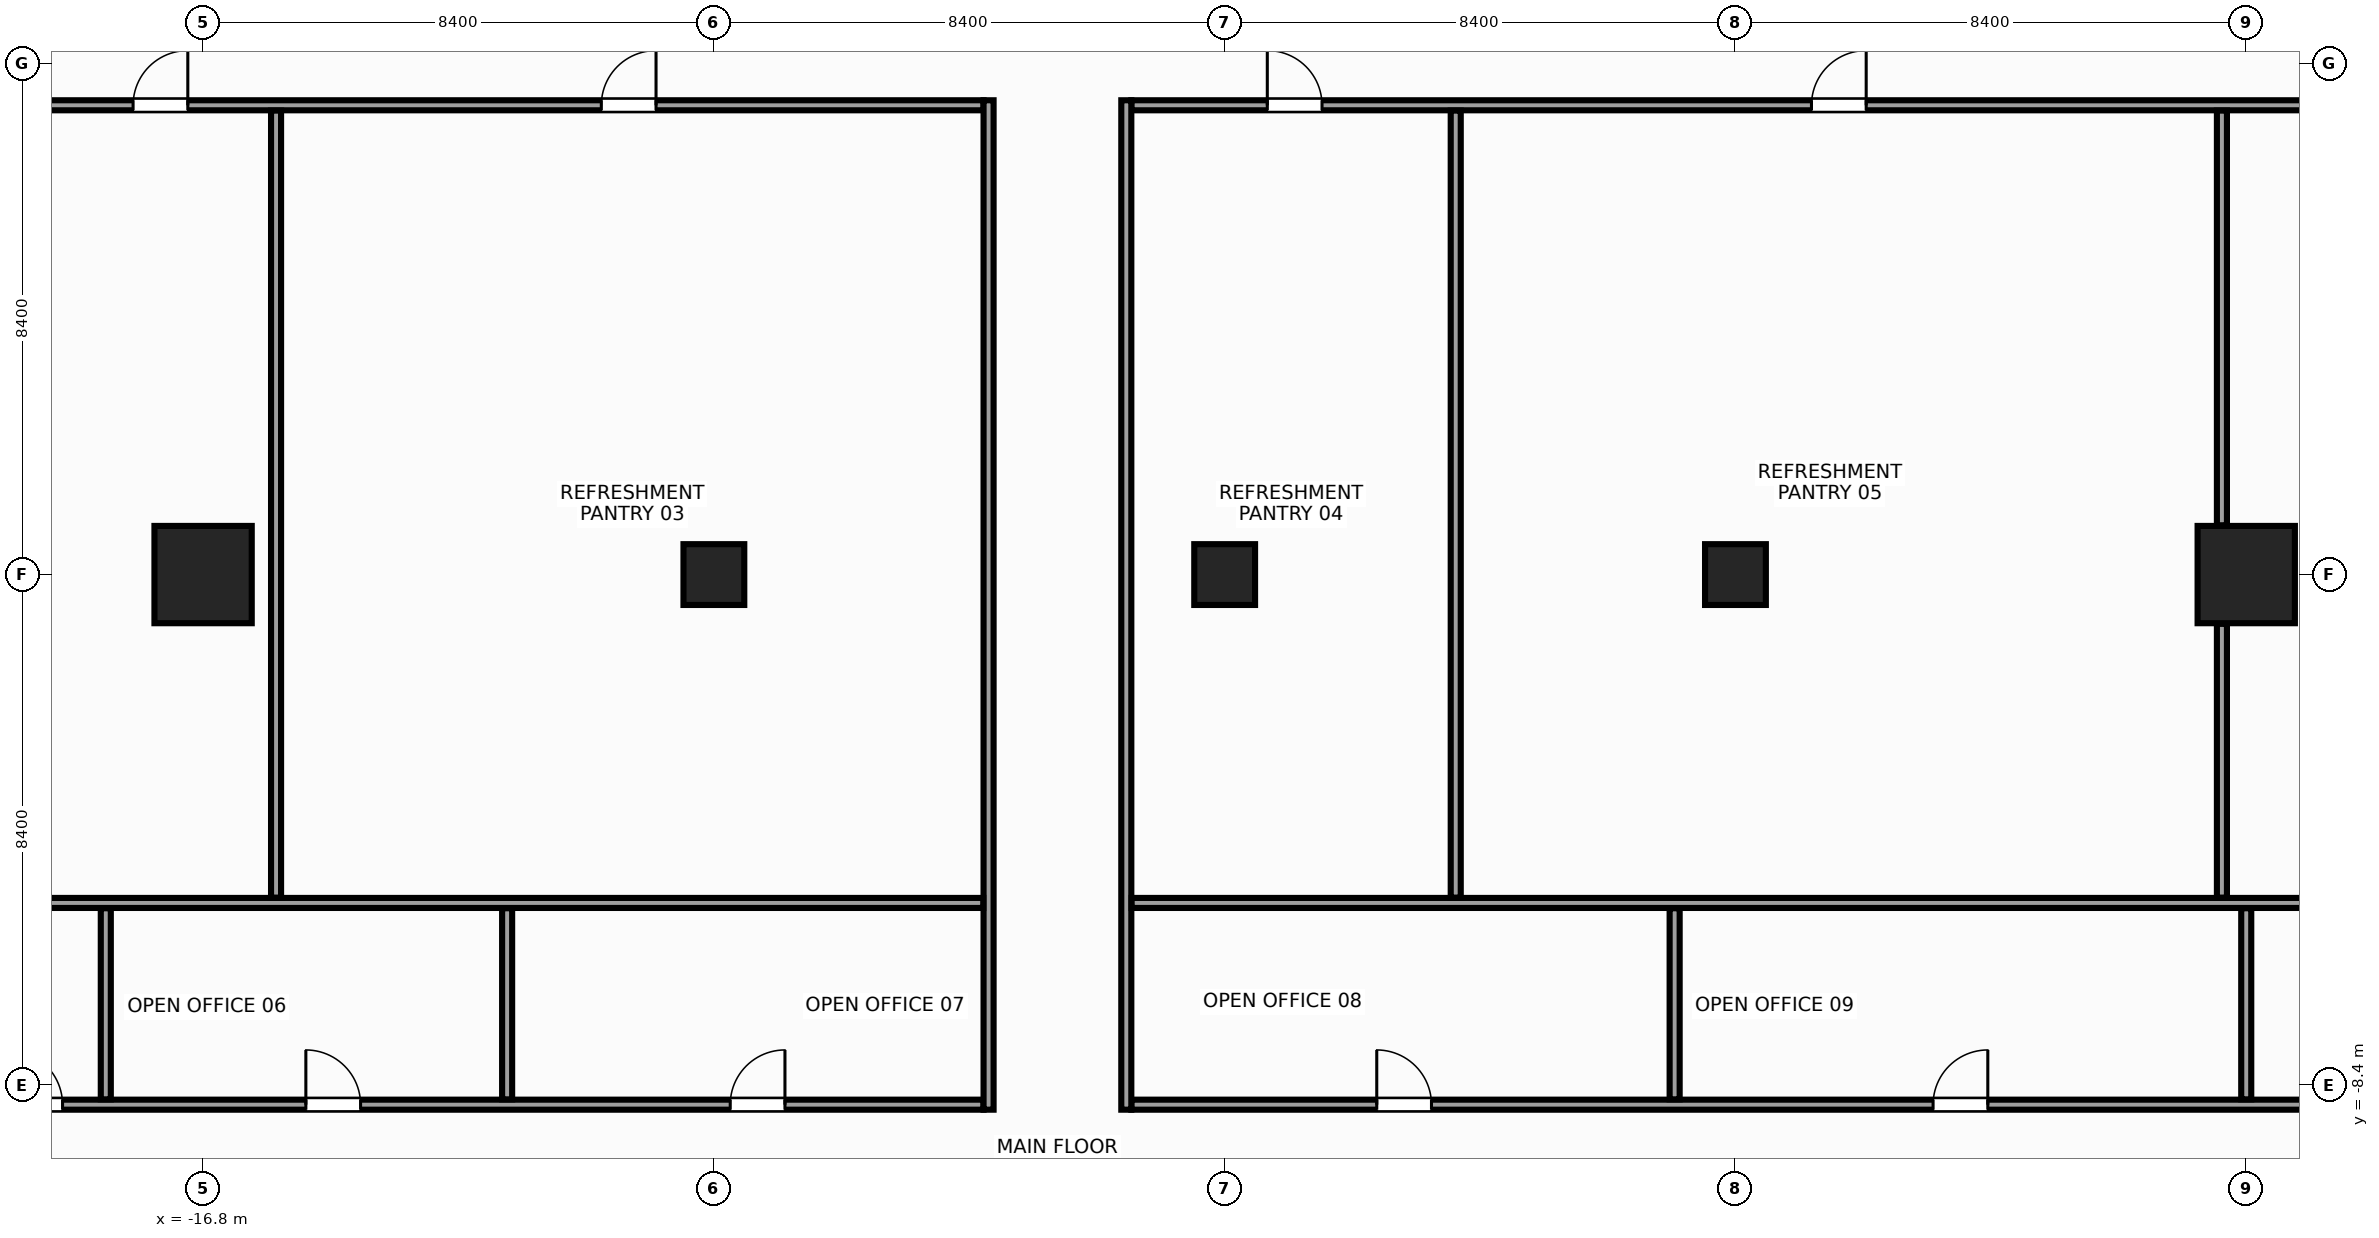
"""IFC4 building model, lengths in metres.
Left out: names, types, materials, properties, quantities, classifications, styles, units other than length and angle.
Written with IfcOpenShell. Run it as: python <this file> out.ifc"""

import sys

from ifc_helpers import new_model, si_unit, direction, frame, frame_2d, origin, origin_with_axes, origin_2d, place, context, subcontext, project, spatial, rectangle, hollow_rectangle, extrude, source, transform, mapped, element, fill, save


model = new_model("IFC4")
c1 = context("Model", 3, precision=1e-05, world=origin(), true_north=direction((0.0, 1.0)))
c2 = subcontext(c1, "Body", "Model", "MODEL_VIEW")
j1 = project(units=[si_unit("LENGTHUNIT", "METRE"), si_unit("PLANEANGLEUNIT", "RADIAN")], contexts=[c1])
p1 = place(None, origin())
s1 = spatial("IfcSite", under=j1, at=p1, CompositionType="ELEMENT")
p2 = place(p1, origin())
s2 = spatial("IfcBuilding", under=s1, at=p2, CompositionType="ELEMENT")
p3 = place(p2, frame((0.0, 0.0, 106.4)))
s3 = spatial("IfcBuildingStorey", under=s2, at=p3, CompositionType="ELEMENT", Elevation=106.4)
m1 = source(origin(), c2, "Body", "SweptSolid", [
    extrude(rectangle(XDim=1.6, YDim=1.6, at=origin_2d()), origin(), (0.0, 0.0, 1.0), 3.6),
])
for number, where, z_axis, x_axis in (
    (1, (-16.8, 0.0, 0.0), (0.0, 0.0, 1.0), (1.0, 0.0, 0.0)),
    (2, (16.8, 0.0, 0.0), (0.0, 0.0, 1.0), (1.0, 0.0, 0.0)),
):
    element("IfcColumn", number, at=place(p3, frame(where, z_axis=z_axis, x_axis=x_axis)), inside=s3, PredefinedType="COLUMN", context=c2, shape_type="MappedRepresentation", body=[
        mapped(m1, transform((0.0, 0.0, 0.0), x_axis=(1.0, 0.0, 0.0), y_axis=(0.0, 1.0, 0.0), z_axis=(0.0, 0.0, 1.0), scale=1.0)),
    ])
m2 = source(origin(), c2, "Body", "SweptSolid", [
    extrude(hollow_rectangle(XDim=1.0, YDim=1.0, WallThickness=0.045, at=origin_2d()), origin(), (0.0, 0.0, 1.0), 3.6),
])
for number, where, z_axis, x_axis in (
    (3, (-8.4, 0.0, 0.0), (0.0, 0.0, 1.0), (1.0, 0.0, 0.0)),
    (4, (8.4, 0.0, 0.0), (0.0, 0.0, 1.0), (1.0, 0.0, 0.0)),
):
    element("IfcColumn", number, at=place(p3, frame(where, z_axis=z_axis, x_axis=x_axis)), inside=s3, PredefinedType="COLUMN", context=c2, shape_type="MappedRepresentation", body=[
        mapped(m2, transform((0.0, 0.0, 0.0), x_axis=(1.0, 0.0, 0.0), y_axis=(0.0, 1.0, 0.0), z_axis=(0.0, 0.0, 1.0), scale=1.0)),
    ])
m3 = source(origin(), c2, "Body", "SweptSolid", [
    extrude(rectangle(XDim=1.0, YDim=1.0, at=origin_2d()), origin(), (0.0, 0.0, 1.0), 3.6),
])
p4 = place(p3, origin_with_axes())
e5 = element("IfcColumn", 5, at=p4, inside=s3, PredefinedType="COLUMN", context=c2, shape_type="MappedRepresentation", body=[
    mapped(m3, transform((0.0, 0.0, 0.0), x_axis=(1.0, 0.0, 0.0), y_axis=(0.0, 1.0, 0.0), z_axis=(0.0, 0.0, 1.0), scale=1.0)),
])
m4 = source(origin(), c2, "Body", "SweptSolid", [
    extrude(rectangle(XDim=16.8, YDim=0.165, at=frame_2d((8.4, 0.0))), origin(), (0.0, 0.0, 1.0), 2.745),
])
p5 = place(p3, frame((-20.765, 7.718, 0.0), z_axis=(0.0, 0.0, 1.0), x_axis=(1.0, 0.0, 0.0)))
e6 = element("IfcWall", 6, at=p5, inside=s3, PredefinedType="PARTITIONING", context=c2, shape_type="MappedRepresentation", body=[
    mapped(m4, transform((0.0, 0.0, 0.0), x_axis=(1.0, 0.0, 0.0), y_axis=(0.0, 1.0, 0.0), z_axis=(0.0, 0.0, 1.0), scale=1.0)),
])
p6 = place(p5, frame((2.814, 0.0, 0.0)))
e7 = element("IfcOpeningElement", 7, at=p6, cuts=e6, PredefinedType="OPENING", context=c2, shape_type="SweptSolid", body=[
    extrude(rectangle(XDim=0.9, YDim=2.15, at=frame_2d((0.45, 1.075))), frame((0.0, 0.094, 0.0), z_axis=(0.0, -1.0, 0.0), x_axis=(1.0, 0.0, 0.0)), (0.0, 0.0, 1.0), 0.189),
])
p7 = place(p5, frame((10.514, 0.0, 0.0)))
e8 = element("IfcOpeningElement", 8, at=p7, cuts=e6, PredefinedType="OPENING", context=c2, shape_type="SweptSolid", body=[
    extrude(rectangle(XDim=0.9, YDim=2.15, at=frame_2d((0.45, 1.075))), frame((0.0, 0.094, 0.0), z_axis=(0.0, -1.0, 0.0), x_axis=(1.0, 0.0, 0.0)), (0.0, 0.0, 1.0), 0.189),
])
m5 = source(origin(), c2, "Body", "SweptSolid", [
    extrude(rectangle(XDim=22.3, YDim=0.165, at=frame_2d((11.15, 0.0))), origin(), (0.0, 0.0, 1.0), 2.745),
])
p8 = place(p3, frame((-1.535, 7.718, 0.0), z_axis=(0.0, 0.0, 1.0), x_axis=(1.0, 0.0, 0.0)))
e9 = element("IfcWall", 9, at=p8, inside=s3, PredefinedType="PARTITIONING", context=c2, shape_type="MappedRepresentation", body=[
    mapped(m5, transform((0.0, 0.0, 0.0), x_axis=(1.0, 0.0, 0.0), y_axis=(0.0, 1.0, 0.0), z_axis=(0.0, 0.0, 1.0), scale=1.0)),
])
p9 = place(p8, frame((19.646, 0.0, 0.0)))
e10 = element("IfcOpeningElement", 10, at=p9, cuts=e9, PredefinedType="OPENING", context=c2, shape_type="SweptSolid", body=[
    extrude(rectangle(XDim=0.9, YDim=2.15, at=frame_2d((0.45, 1.075))), frame((0.0, 0.094, 0.0), z_axis=(0.0, -1.0, 0.0), x_axis=(1.0, 0.0, 0.0)), (0.0, 0.0, 1.0), 0.189),
])
p10 = place(p8, frame((2.236, 0.0, 0.0)))
e11 = element("IfcOpeningElement", 11, at=p10, cuts=e9, PredefinedType="OPENING", context=c2, shape_type="SweptSolid", body=[
    extrude(rectangle(XDim=0.9, YDim=2.15, at=frame_2d((0.45, 1.075))), frame((0.0, 0.094, 0.0), z_axis=(0.0, -1.0, 0.0), x_axis=(1.0, 0.0, 0.0)), (0.0, 0.0, 1.0), 0.189),
])
p11 = place(p8, frame((11.185, 0.0, 0.0)))
e12 = element("IfcOpeningElement", 12, at=p11, cuts=e9, PredefinedType="OPENING", context=c2, shape_type="SweptSolid", body=[
    extrude(rectangle(XDim=0.9, YDim=2.15, at=frame_2d((0.45, 1.075))), frame((0.0, 0.094, 0.0), z_axis=(0.0, -1.0, 0.0), x_axis=(1.0, 0.0, 0.0)), (0.0, 0.0, 1.0), 0.189),
])
p12 = place(p3, frame((-20.765, -8.718, 0.0), z_axis=(0.0, 0.0, 1.0), x_axis=(1.0, 0.0, 0.0)))
e13 = element("IfcWall", 13, at=p12, inside=s3, PredefinedType="PARTITIONING", context=c2, shape_type="MappedRepresentation", body=[
    mapped(m4, transform((0.0, 0.0, 0.0), x_axis=(1.0, 0.0, 0.0), y_axis=(0.0, 1.0, 0.0), z_axis=(0.0, 0.0, 1.0), scale=1.0)),
])
p13 = place(p12, frame((5.655, 0.0, 0.0)))
e14 = element("IfcOpeningElement", 14, at=p13, cuts=e13, PredefinedType="OPENING", context=c2, shape_type="SweptSolid", body=[
    extrude(rectangle(XDim=0.9, YDim=2.15, at=frame_2d((0.45, 1.075))), frame((0.0, 0.094, 0.0), z_axis=(0.0, -1.0, 0.0), x_axis=(1.0, 0.0, 0.0)), (0.0, 0.0, 1.0), 0.189),
])
p14 = place(p12, frame((12.634, 0.0, 0.0)))
e15 = element("IfcOpeningElement", 15, at=p14, cuts=e13, PredefinedType="OPENING", context=c2, shape_type="SweptSolid", body=[
    extrude(rectangle(XDim=0.9, YDim=2.15, at=frame_2d((0.45, 1.075))), frame((0.0, 0.094, 0.0), z_axis=(0.0, -1.0, 0.0), x_axis=(1.0, 0.0, 0.0)), (0.0, 0.0, 1.0), 0.189),
])
p15 = place(p12, frame((0.754, 0.0, 0.0)))
e16 = element("IfcOpeningElement", 16, at=p15, cuts=e13, PredefinedType="OPENING", context=c2, shape_type="SweptSolid", body=[
    extrude(rectangle(XDim=0.9, YDim=2.15, at=frame_2d((0.45, 1.075))), frame((0.0, 0.094, 0.0), z_axis=(0.0, -1.0, 0.0), x_axis=(1.0, 0.0, 0.0)), (0.0, 0.0, 1.0), 0.189),
])
p16 = place(p3, frame((-1.535, -8.718, 0.0), z_axis=(0.0, 0.0, 1.0), x_axis=(1.0, 0.0, 0.0)))
e17 = element("IfcWall", 17, at=p16, inside=s3, PredefinedType="PARTITIONING", context=c2, shape_type="MappedRepresentation", body=[
    mapped(m5, transform((0.0, 0.0, 0.0), x_axis=(1.0, 0.0, 0.0), y_axis=(0.0, 1.0, 0.0), z_axis=(0.0, 0.0, 1.0), scale=1.0)),
])
p17 = place(p16, frame((4.036, 0.0, 0.0)))
e18 = element("IfcOpeningElement", 18, at=p17, cuts=e17, PredefinedType="OPENING", context=c2, shape_type="SweptSolid", body=[
    extrude(rectangle(XDim=0.9, YDim=2.15, at=frame_2d((0.45, 1.075))), frame((0.0, 0.094, 0.0), z_axis=(0.0, -1.0, 0.0), x_axis=(1.0, 0.0, 0.0)), (0.0, 0.0, 1.0), 0.189),
])
p18 = place(p16, frame((13.185, 0.0, 0.0)))
e19 = element("IfcOpeningElement", 19, at=p18, cuts=e17, PredefinedType="OPENING", context=c2, shape_type="SweptSolid", body=[
    extrude(rectangle(XDim=0.9, YDim=2.15, at=frame_2d((0.45, 1.075))), frame((0.0, 0.094, 0.0), z_axis=(0.0, -1.0, 0.0), x_axis=(1.0, 0.0, 0.0)), (0.0, 0.0, 1.0), 0.189),
])
p19 = place(p16, frame((19.846, 0.0, 0.0)))
e20 = element("IfcOpeningElement", 20, at=p19, cuts=e17, PredefinedType="OPENING", context=c2, shape_type="SweptSolid", body=[
    extrude(rectangle(XDim=0.9, YDim=2.15, at=frame_2d((0.45, 1.075))), frame((0.0, 0.094, 0.0), z_axis=(0.0, -1.0, 0.0), x_axis=(1.0, 0.0, 0.0)), (0.0, 0.0, 1.0), 0.189),
])
m6 = source(origin(), c2, "Body", "SweptSolid", [
    extrude(rectangle(XDim=16.6, YDim=0.165, at=frame_2d((8.3, 0.0))), origin(), (0.0, 0.0, 1.0), 2.645),
])
for number, where, z_axis, x_axis in (
    (21, (-3.883, -8.8, 0.0), (0.0, 0.0, 1.0), (0.0, 1.0, 0.0)),
    (22, (-1.617, -8.8, 0.0), (0.0, 0.0, 1.0), (0.0, 1.0, 0.0)),
):
    element("IfcWall", number, at=place(p3, frame(where, z_axis=z_axis, x_axis=x_axis)), inside=s3, PredefinedType="PARTITIONING", context=c2, shape_type="MappedRepresentation", body=[
        mapped(m6, transform((0.0, 0.0, 0.0), x_axis=(1.0, 0.0, 0.0), y_axis=(0.0, 1.0, 0.0), z_axis=(0.0, 0.0, 1.0), scale=1.0)),
    ])
m7 = source(origin(), c2, "Body", "SweptSolid", [
    extrude(rectangle(XDim=21.38, YDim=0.165, at=frame_2d((10.69, 0.0))), origin(), (0.0, 0.0, 1.0), 2.745),
])
p20 = place(p3, frame((-25.35, -5.4, 0.0), z_axis=(0.0, 0.0, 1.0), x_axis=(1.0, 0.0, 0.0)))
e23 = element("IfcWall", 23, at=p20, inside=s3, PredefinedType="PARTITIONING", context=c2, shape_type="MappedRepresentation", body=[
    mapped(m7, transform((0.0, 0.0, 0.0), x_axis=(1.0, 0.0, 0.0), y_axis=(0.0, 1.0, 0.0), z_axis=(0.0, 0.0, 1.0), scale=1.0)),
])
m8 = source(origin(), c2, "Body", "SweptSolid", [
    extrude(rectangle(XDim=26.88, YDim=0.165, at=frame_2d((13.44, 0.0))), origin(), (0.0, 0.0, 1.0), 2.745),
])
p21 = place(p3, frame((-1.53, -5.4, 0.0), z_axis=(0.0, 0.0, 1.0), x_axis=(1.0, 0.0, 0.0)))
e24 = element("IfcWall", 24, at=p21, inside=s3, PredefinedType="PARTITIONING", context=c2, shape_type="MappedRepresentation", body=[
    mapped(m8, transform((0.0, 0.0, 0.0), x_axis=(1.0, 0.0, 0.0), y_axis=(0.0, 1.0, 0.0), z_axis=(0.0, 0.0, 1.0), scale=1.0)),
])
m9 = source(origin(), c2, "Body", "SweptSolid", [
    extrude(rectangle(XDim=12.942, YDim=0.165, at=frame_2d((6.471, 0.0))), origin(), (0.0, 0.0, 1.0), 2.645),
])
for number, where, z_axis, x_axis in (
    (25, (-15.6, -5.312, 0.0), (0.0, 0.0, 1.0), (0.0, 1.0, 0.0)),
    (26, (3.8, -5.312, 0.0), (0.0, 0.0, 1.0), (0.0, 1.0, 0.0)),
):
    element("IfcWall", number, at=place(p3, frame(where, z_axis=z_axis, x_axis=x_axis)), inside=s3, PredefinedType="PARTITIONING", context=c2, shape_type="MappedRepresentation", body=[
        mapped(m9, transform((0.0, 0.0, 0.0), x_axis=(1.0, 0.0, 0.0), y_axis=(0.0, 1.0, 0.0), z_axis=(0.0, 0.0, 1.0), scale=1.0)),
    ])
m10 = source(origin(), c2, "Body", "SweptSolid", [
    extrude(rectangle(XDim=4.502, YDim=0.165, at=frame_2d((2.251, 0.0))), origin(), (0.0, 0.0, 1.0), 3.36),
])
p22 = place(p3, frame((16.4, -5.312, 0.0), z_axis=(0.0, 0.0, 1.0), x_axis=(0.0, 1.0, 0.0)))
e27 = element("IfcWall", 27, at=p22, inside=s3, PredefinedType="PARTITIONING", context=c2, shape_type="MappedRepresentation", body=[
    mapped(m10, transform((0.0, 0.0, 0.0), x_axis=(1.0, 0.0, 0.0), y_axis=(0.0, 1.0, 0.0), z_axis=(0.0, 0.0, 1.0), scale=1.0)),
])
m11 = source(origin(), c2, "Body", "SweptSolid", [
    extrude(rectangle(XDim=6.82, YDim=0.165, at=frame_2d((3.41, 0.0))), origin(), (0.0, 0.0, 1.0), 2.645),
])
p23 = place(p3, frame((16.4, 0.81, 0.0), z_axis=(0.0, 0.0, 1.0), x_axis=(0.0, 1.0, 0.0)))
e28 = element("IfcWall", 28, at=p23, inside=s3, PredefinedType="PARTITIONING", context=c2, shape_type="MappedRepresentation", body=[
    mapped(m11, transform((0.0, 0.0, 0.0), x_axis=(1.0, 0.0, 0.0), y_axis=(0.0, 1.0, 0.0), z_axis=(0.0, 0.0, 1.0), scale=1.0)),
])
m12 = source(origin(), c2, "Body", "SweptSolid", [
    extrude(rectangle(XDim=3.142, YDim=0.165, at=frame_2d((1.571, 0.0))), origin(), (0.0, 0.0, 1.0), 3.36),
])
for number, where, z_axis, x_axis in (
    (29, (-18.4, -8.63, 0.0), (0.0, 0.0, 1.0), (0.0, 1.0, 0.0)),
    (30, (-11.8, -8.63, 0.0), (0.0, 0.0, 1.0), (0.0, 1.0, 0.0)),
    (31, (7.4, -8.63, 0.0), (0.0, 0.0, 1.0), (0.0, 1.0, 0.0)),
):
    element("IfcWall", number, at=place(p3, frame(where, z_axis=z_axis, x_axis=x_axis)), inside=s3, PredefinedType="PARTITIONING", context=c2, shape_type="MappedRepresentation", body=[
        mapped(m12, transform((0.0, 0.0, 0.0), x_axis=(1.0, 0.0, 0.0), y_axis=(0.0, 1.0, 0.0), z_axis=(0.0, 0.0, 1.0), scale=1.0)),
    ])
m13 = source(origin(), c2, "Body", "SweptSolid", [
    extrude(rectangle(XDim=3.142, YDim=0.165, at=frame_2d((1.571, 0.0))), origin(), (0.0, 0.0, 1.0), 2.745),
])
p24 = place(p3, frame((16.8, -8.63, 0.0), z_axis=(0.0, 0.0, 1.0), x_axis=(0.0, 1.0, 0.0)))
e32 = element("IfcWall", 32, at=p24, inside=s3, PredefinedType="PARTITIONING", context=c2, shape_type="MappedRepresentation", body=[
    mapped(m13, transform((0.0, 0.0, 0.0), x_axis=(1.0, 0.0, 0.0), y_axis=(0.0, 1.0, 0.0), z_axis=(0.0, 0.0, 1.0), scale=1.0)),
])
m14 = source(origin(), c2, "Body", "SweptSolid", [
    extrude(rectangle(XDim=0.9, YDim=2.15, at=frame_2d((0.45, 1.075))), frame((0.0, 0.025, 0.0), z_axis=(0.0, -1.0, 0.0), x_axis=(1.0, 0.0, 0.0)), (0.0, 0.0, 1.0), 0.05),
])
p25 = place(p6, origin())
e33 = element("IfcDoor", 33, at=p25, inside=s3, OperationType="SINGLE_SWING_RIGHT", PredefinedType="DOOR", context=c2, shape_type="MappedRepresentation", body=[
    mapped(m14, transform((0.0, 0.0, 0.0), x_axis=(1.0, 0.0, 0.0), y_axis=(0.0, 1.0, 0.0), z_axis=(0.0, 0.0, 1.0), scale=1.0)),
])
fill(e7, e33)
p26 = place(p7, origin())
e34 = element("IfcDoor", 34, at=p26, inside=s3, OperationType="SINGLE_SWING_RIGHT", PredefinedType="DOOR", context=c2, shape_type="MappedRepresentation", body=[
    mapped(m14, transform((0.0, 0.0, 0.0), x_axis=(1.0, 0.0, 0.0), y_axis=(0.0, 1.0, 0.0), z_axis=(0.0, 0.0, 1.0), scale=1.0)),
])
fill(e8, e34)
p27 = place(p10, origin())
e35 = element("IfcDoor", 35, at=p27, inside=s3, OperationType="SINGLE_SWING_LEFT", PredefinedType="DOOR", context=c2, shape_type="MappedRepresentation", body=[
    mapped(m14, transform((0.0, 0.0, 0.0), x_axis=(1.0, 0.0, 0.0), y_axis=(0.0, 1.0, 0.0), z_axis=(0.0, 0.0, 1.0), scale=1.0)),
])
fill(e11, e35)
p28 = place(p11, origin())
e36 = element("IfcDoor", 36, at=p28, inside=s3, OperationType="SINGLE_SWING_RIGHT", PredefinedType="DOOR", context=c2, shape_type="MappedRepresentation", body=[
    mapped(m14, transform((0.0, 0.0, 0.0), x_axis=(1.0, 0.0, 0.0), y_axis=(0.0, 1.0, 0.0), z_axis=(0.0, 0.0, 1.0), scale=1.0)),
])
fill(e12, e36)
p29 = place(p13, origin())
e37 = element("IfcDoor", 37, at=p29, inside=s3, OperationType="SINGLE_SWING_LEFT", PredefinedType="DOOR", context=c2, shape_type="MappedRepresentation", body=[
    mapped(m14, transform((0.0, 0.0, 0.0), x_axis=(1.0, 0.0, 0.0), y_axis=(0.0, 1.0, 0.0), z_axis=(0.0, 0.0, 1.0), scale=1.0)),
])
fill(e14, e37)
p30 = place(p14, origin())
e38 = element("IfcDoor", 38, at=p30, inside=s3, OperationType="SINGLE_SWING_RIGHT", PredefinedType="DOOR", context=c2, shape_type="MappedRepresentation", body=[
    mapped(m14, transform((0.0, 0.0, 0.0), x_axis=(1.0, 0.0, 0.0), y_axis=(0.0, 1.0, 0.0), z_axis=(0.0, 0.0, 1.0), scale=1.0)),
])
fill(e15, e38)
p31 = place(p17, origin())
e39 = element("IfcDoor", 39, at=p31, inside=s3, OperationType="SINGLE_SWING_LEFT", PredefinedType="DOOR", context=c2, shape_type="MappedRepresentation", body=[
    mapped(m14, transform((0.0, 0.0, 0.0), x_axis=(1.0, 0.0, 0.0), y_axis=(0.0, 1.0, 0.0), z_axis=(0.0, 0.0, 1.0), scale=1.0)),
])
fill(e18, e39)
p32 = place(p18, origin())
e40 = element("IfcDoor", 40, at=p32, inside=s3, OperationType="SINGLE_SWING_RIGHT", PredefinedType="DOOR", context=c2, shape_type="MappedRepresentation", body=[
    mapped(m14, transform((0.0, 0.0, 0.0), x_axis=(1.0, 0.0, 0.0), y_axis=(0.0, 1.0, 0.0), z_axis=(0.0, 0.0, 1.0), scale=1.0)),
])
fill(e19, e40)
p33 = place(p15, origin())
e41 = element("IfcDoor", 41, at=p33, inside=s3, OperationType="SINGLE_SWING_LEFT", PredefinedType="DOOR", context=c2, shape_type="MappedRepresentation", body=[
    mapped(m14, transform((0.0, 0.0, 0.0), x_axis=(1.0, 0.0, 0.0), y_axis=(0.0, 1.0, 0.0), z_axis=(0.0, 0.0, 1.0), scale=1.0)),
])
fill(e16, e41)
save(model, sys.argv[1])
